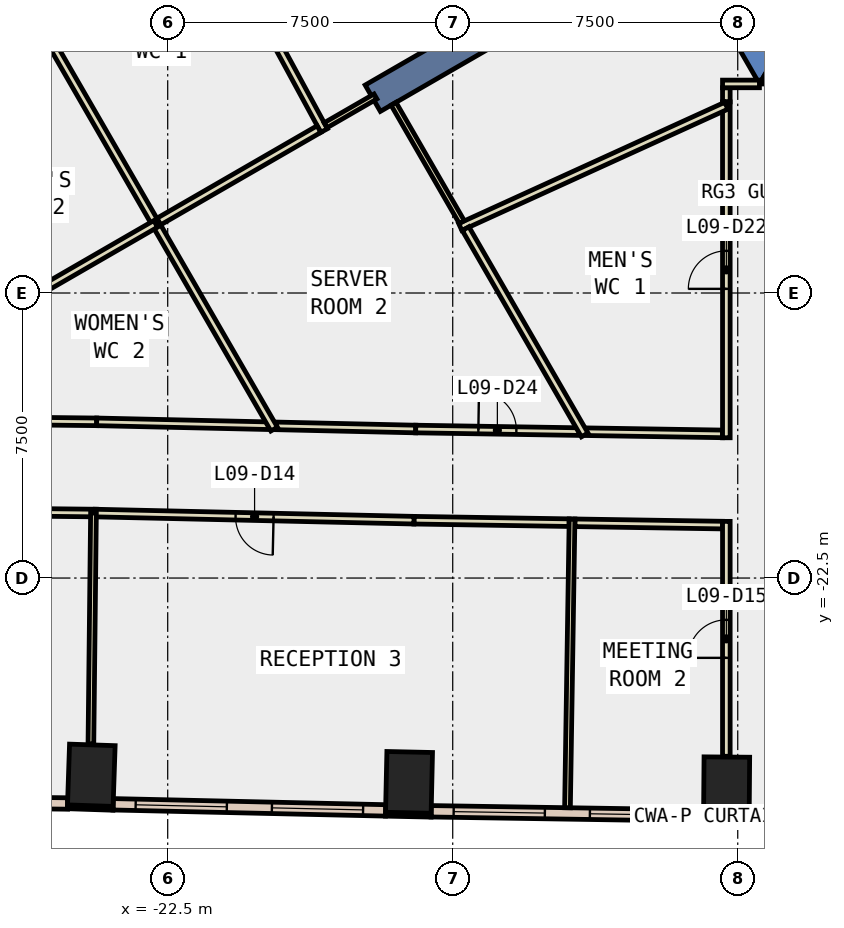
"""IFC4 building model, lengths in metres.
Left out: names, types, materials, properties, quantities, classifications, styles, units other than length and angle.
Written with IfcOpenShell. Run it as: python <this file> out.ifc"""

import sys

from ifc_helpers import new_model, si_unit, direction, frame, frame_2d, origin, origin_2d, place, context, subcontext, project, spatial, polyline, rectangle, outline, extrude, element, fill, save


model = new_model("IFC4")
c1 = context("Model", 3, precision=1e-05, world=origin(), true_north=direction((0.0, 1.0)))
c2 = subcontext(c1, "Body", "Model", "MODEL_VIEW")
j1 = project(units=[si_unit("LENGTHUNIT", "METRE"), si_unit("PLANEANGLEUNIT", "RADIAN")], contexts=[c1])
p1 = place(None, origin())
s1 = spatial("IfcSite", under=j1, at=p1, CompositionType="ELEMENT")
p2 = place(p1, origin())
s2 = spatial("IfcBuilding", under=s1, at=p2, CompositionType="ELEMENT")
p3 = place(p2, frame((0.0, 0.0, 47.6)))
s3 = spatial("IfcBuildingStorey", under=s2, at=p3, CompositionType="ELEMENT", Elevation=47.6)
for number, where, z_axis, x_axis in (
    (1, (-24.51, -27.69, -0.4), (0.0, 0.0, 1.0), (-0.999, 0.034, 0.0)),
    (2, (-16.15, -27.877, -0.4), (0.0, 0.0, 1.0), (-1.0, 0.022, 0.0)),
    (3, (-7.793, -28.01, -0.4), (0.0, 0.0, 1.0), (-1.0, 0.008, 0.0)),
):
    element("IfcColumn", number, at=place(p3, frame(where, z_axis=z_axis, x_axis=x_axis)), inside=s3, PredefinedType="COLUMN", context=c2, shape_type="SweptSolid", body=[
        extrude(rectangle(XDim=1.2, YDim=1.6, at=origin_2d()), origin(), (0.0, 0.0, 1.0), 4.2),
    ])
p4 = place(p3, frame((0.0, 0.0, -0.4)))
e4 = element("IfcWall", 4, at=p4, inside=s3, PredefinedType="SHEAR", context=c2, shape_type="SweptSolid", body=[
    extrude(outline(polyline([(-13.856, 2.5), (-6.928, -9.5), (-6.351, -8.5), (-12.702, 2.5), (-13.856, 2.5)])), origin(), (0.0, 0.0, 1.0), 4.2),
])
p5 = place(p3, frame((0.0, 0.0, -0.4)))
e5 = element("IfcWall", 5, at=p5, inside=s3, PredefinedType="SHEAR", context=c2, shape_type="SweptSolid", body=[
    extrude(outline(polyline([(3.75, -9.5), (3.75, -8.5), (-6.351, -8.5), (-6.928, -9.5), (3.75, -9.5)])), origin(), (0.0, 0.0, 1.0), 4.2),
])
p6 = place(p3, frame((-9.31, -5.375, -0.4), z_axis=(0.0, 0.0, 1.0), x_axis=(-0.866017533419, -0.500013631625, 0.0)))
e6 = element("IfcWall", 6, at=p6, inside=s3, PredefinedType="SHEAR", context=c2, shape_type="SweptSolid", body=[
    extrude(rectangle(XDim=9.0, YDim=0.8, at=frame_2d((4.5, 0.0))), origin(), (0.0, 0.0, 1.0), 4.2),
])
p7 = place(p3, frame((-25.138, -28.519, 0.0), z_axis=(0.0, 0.0, 1.0), x_axis=(0.999442872267, -0.03337581573, 0.0)))
e7 = element("IfcWall", 7, at=p7, inside=s3, PredefinedType="STANDARD", context=c2, shape_type="SweptSolid", body=[
    extrude(rectangle(XDim=1.2, YDim=0.1, at=frame_2d((0.6, 0.0))), origin(), (0.0, 0.0, 1.0), 3.8),
])
p8 = place(p3, frame((-16.769, -28.714, 0.0), z_axis=(0.0, 0.0, 1.0), x_axis=(0.99976752127, -0.021561618973, 0.0)))
e8 = element("IfcWall", 8, at=p8, inside=s3, PredefinedType="STANDARD", context=c2, shape_type="SweptSolid", body=[
    extrude(rectangle(XDim=1.2, YDim=0.1, at=frame_2d((0.6, 0.0))), origin(), (0.0, 0.0, 1.0), 3.8),
])
p9 = place(p3, frame((-8.4, -28.855, 0.0), z_axis=(0.0, 0.0, 1.0), x_axis=(0.999965208912, -0.008341520563, 0.0)))
e9 = element("IfcWall", 9, at=p9, inside=s3, PredefinedType="STANDARD", context=c2, shape_type="SweptSolid", body=[
    extrude(rectangle(XDim=1.2, YDim=0.1, at=frame_2d((0.6, 0.0))), origin(), (0.0, 0.0, 1.0), 3.8),
])
p10 = place(p3, frame((-32.279, -28.353, 0.0), z_axis=(0.0, 0.0, 1.0), x_axis=(0.999939101213, -0.011036025753, 0.0)))
e10 = element("IfcWall", 10, at=p10, inside=s3, PredefinedType="STANDARD", context=c2, shape_type="SweptSolid", body=[
    extrude(rectangle(XDim=7.146, YDim=0.3, at=frame_2d((3.573, 0.0))), origin(), (0.0, 0.0, 1.0), 3.8),
])
p11 = place(p10, frame((0.586, 0.0, 0.9)))
e11 = element("IfcOpeningElement", 11, at=p11, cuts=e10, PredefinedType="OPENING", context=c2, shape_type="SweptSolid", body=[
    extrude(rectangle(XDim=2.4, YDim=2.6, at=frame_2d((1.2, 1.3))), frame((0.0, 0.16, 0.0), z_axis=(0.0, -1.0, 0.0), x_axis=(1.0, 0.0, 0.0)), (0.0, 0.0, 1.0), 0.32),
])
p12 = place(p10, frame((4.159, 0.0, 0.9)))
e12 = element("IfcOpeningElement", 12, at=p12, cuts=e10, PredefinedType="OPENING", context=c2, shape_type="SweptSolid", body=[
    extrude(rectangle(XDim=2.4, YDim=2.6, at=frame_2d((1.2, 1.3))), frame((0.0, 0.16, 0.0), z_axis=(0.0, -1.0, 0.0), x_axis=(1.0, 0.0, 0.0)), (0.0, 0.0, 1.0), 0.32),
])
p13 = place(p3, frame((-23.936, -28.453, 0.0), z_axis=(0.0, 0.0, 1.0), x_axis=(0.999747567852, -0.022467767461, 0.0)))
e13 = element("IfcWall", 13, at=p13, inside=s3, PredefinedType="STANDARD", context=c2, shape_type="SweptSolid", body=[
    extrude(rectangle(XDim=7.172, YDim=0.3, at=frame_2d((3.586, 0.0))), origin(), (0.0, 0.0, 1.0), 3.8),
])
p14 = place(p13, frame((0.593, 0.0, 0.9)))
e14 = element("IfcOpeningElement", 14, at=p14, cuts=e13, PredefinedType="OPENING", context=c2, shape_type="SweptSolid", body=[
    extrude(rectangle(XDim=2.4, YDim=2.6, at=frame_2d((1.2, 1.3))), frame((0.0, 0.16, 0.0), z_axis=(0.0, -1.0, 0.0), x_axis=(1.0, 0.0, 0.0)), (0.0, 0.0, 1.0), 0.32),
])
p15 = place(p13, frame((4.179, 0.0, 0.9)))
e15 = element("IfcOpeningElement", 15, at=p15, cuts=e13, PredefinedType="OPENING", context=c2, shape_type="SweptSolid", body=[
    extrude(rectangle(XDim=2.4, YDim=2.6, at=frame_2d((1.2, 1.3))), frame((0.0, 0.16, 0.0), z_axis=(0.0, -1.0, 0.0), x_axis=(1.0, 0.0, 0.0)), (0.0, 0.0, 1.0), 0.32),
])
p16 = place(p3, frame((-15.568, -28.637, 0.0), z_axis=(0.0, 0.0, 1.0), x_axis=(0.999875756772, -0.015762963512, 0.0)))
e16 = element("IfcWall", 16, at=p16, inside=s3, PredefinedType="STANDARD", context=c2, shape_type="SweptSolid", body=[
    extrude(rectangle(XDim=7.171, YDim=0.3, at=frame_2d((3.585, 0.0))), origin(), (0.0, 0.0, 1.0), 3.8),
])
p17 = place(p16, frame((0.593, 0.0, 0.9)))
e17 = element("IfcOpeningElement", 17, at=p17, cuts=e16, PredefinedType="OPENING", context=c2, shape_type="SweptSolid", body=[
    extrude(rectangle(XDim=2.4, YDim=2.6, at=frame_2d((1.2, 1.3))), frame((0.0, 0.16, 0.0), z_axis=(0.0, -1.0, 0.0), x_axis=(1.0, 0.0, 0.0)), (0.0, 0.0, 1.0), 0.32),
])
p18 = place(p16, frame((4.178, 0.0, 0.9)))
e18 = element("IfcOpeningElement", 18, at=p18, cuts=e16, PredefinedType="OPENING", context=c2, shape_type="SweptSolid", body=[
    extrude(rectangle(XDim=2.4, YDim=2.6, at=frame_2d((1.2, 1.3))), frame((0.0, 0.16, 0.0), z_axis=(0.0, -1.0, 0.0), x_axis=(1.0, 0.0, 0.0)), (0.0, 0.0, 1.0), 0.32),
])
p19 = place(p3, frame((-11.477, -18.65, 0.0), z_axis=(0.0, 0.0, 1.0), x_axis=(0.9998724957, -0.015968479661, 0.0)))
e19 = element("IfcWall", 19, at=p19, inside=s3, PredefinedType="PARTITIONING", context=c2, shape_type="SweptSolid", body=[
    extrude(rectangle(XDim=3.578, YDim=0.2, at=frame_2d((1.789, 0.0))), origin(), (0.0, 0.0, 1.0), 3.8),
])
p20 = place(p3, frame((-19.649, -18.496, 0.0), z_axis=(0.0, 0.0, 1.0), x_axis=(0.999744980574, -0.02258259988, 0.0)))
e20 = element("IfcWall", 20, at=p20, inside=s3, PredefinedType="PARTITIONING", context=c2, shape_type="SweptSolid", body=[
    extrude(rectangle(XDim=3.676, YDim=0.2, at=frame_2d((1.838, 0.0))), origin(), (0.0, 0.0, 1.0), 3.8),
])
p21 = place(p3, frame((-15.974, -18.579, 0.0), z_axis=(0.0, 0.0, 1.0), x_axis=(0.999875289316, -0.015792587377, 0.0)))
e21 = element("IfcWall", 21, at=p21, inside=s3, PredefinedType="PARTITIONING", context=c2, shape_type="SweptSolid", body=[
    extrude(rectangle(XDim=4.298, YDim=0.2, at=frame_2d((2.149, 0.0))), origin(), (0.0, 0.0, 1.0), 3.8),
])
p22 = place(p21, frame((1.649, 0.0, 0.0)))
e22 = element("IfcOpeningElement", 22, at=p22, cuts=e21, PredefinedType="OPENING", context=c2, shape_type="SweptSolid", body=[
    extrude(rectangle(XDim=1.0, YDim=2.1, at=frame_2d((0.5, 1.05))), frame((0.0, 0.11, 0.0), z_axis=(0.0, -1.0, 0.0), x_axis=(1.0, 0.0, 0.0)), (0.0, 0.0, 1.0), 0.22),
])
p23 = place(p3, frame((-31.431, -18.312, 0.0), z_axis=(0.0, 0.0, 1.0), x_axis=(0.999939195602, -0.011027470214, 0.0)))
e23 = element("IfcWall", 23, at=p23, inside=s3, PredefinedType="PARTITIONING", context=c2, shape_type="SweptSolid", body=[
    extrude(rectangle(XDim=7.062, YDim=0.2, at=frame_2d((3.531, 0.0))), origin(), (0.0, 0.0, 1.0), 3.8),
])
p24 = place(p23, frame((3.031, 0.0, 0.0)))
e24 = element("IfcOpeningElement", 24, at=p24, cuts=e23, PredefinedType="OPENING", context=c2, shape_type="SweptSolid", body=[
    extrude(rectangle(XDim=1.0, YDim=2.1, at=frame_2d((0.5, 1.05))), frame((0.0, 0.11, 0.0), z_axis=(0.0, -1.0, 0.0), x_axis=(1.0, 0.0, 0.0)), (0.0, 0.0, 1.0), 0.22),
])
p25 = place(p3, frame((-24.369, -18.39, 0.0), z_axis=(0.0, 0.0, 1.0), x_axis=(0.99974519793, -0.022572975354, 0.0)))
e25 = element("IfcWall", 25, at=p25, inside=s3, PredefinedType="PARTITIONING", context=c2, shape_type="SweptSolid", body=[
    extrude(rectangle(XDim=4.521, YDim=0.2, at=frame_2d((2.26, 0.0))), origin(), (0.0, 0.0, 1.0), 3.8),
])
p26 = place(p3, frame((-24.378, -20.79, 0.0), z_axis=(0.0, 0.0, 1.0), x_axis=(-0.99993897746, 0.011047232974, 0.0)))
e26 = element("IfcWall", 26, at=p26, inside=s3, PredefinedType="PARTITIONING", context=c2, shape_type="SweptSolid", body=[
    extrude(rectangle(XDim=7.426, YDim=0.2, at=frame_2d((3.713, 0.0))), origin(), (0.0, 0.0, 1.0), 3.8),
])
p27 = place(p3, frame((-11.936, -21.043, 0.0), z_axis=(0.0, 0.0, 1.0), x_axis=(-0.999873595398, 0.015899472524, 0.0)))
e27 = element("IfcWall", 27, at=p27, inside=s3, PredefinedType="PARTITIONING", context=c2, shape_type="SweptSolid", body=[
    extrude(rectangle(XDim=4.084, YDim=0.2, at=frame_2d((2.042, 0.0))), origin(), (0.0, 0.0, 1.0), 3.8),
])
p28 = place(p3, frame((-16.02, -20.978, 0.0), z_axis=(0.0, 0.0, 1.0), x_axis=(-0.999749010047, 0.02240350216, 0.0)))
e28 = element("IfcWall", 28, at=p28, inside=s3, PredefinedType="PARTITIONING", context=c2, shape_type="SweptSolid", body=[
    extrude(rectangle(XDim=8.391, YDim=0.2, at=frame_2d((4.196, 0.0))), origin(), (0.0, 0.0, 1.0), 3.8),
])
p29 = place(p28, frame((3.695, 0.0, 0.0)))
e29 = element("IfcOpeningElement", 29, at=p29, cuts=e28, PredefinedType="OPENING", context=c2, shape_type="SweptSolid", body=[
    extrude(rectangle(XDim=1.0, YDim=2.1, at=frame_2d((0.5, 1.05))), frame((0.0, 0.11, 0.0), z_axis=(0.0, -1.0, 0.0), x_axis=(1.0, 0.0, 0.0)), (0.0, 0.0, 1.0), 0.22),
])
p30 = place(p3, frame((-7.9, -21.107, 0.0), z_axis=(0.0, 0.0, 1.0), x_axis=(-0.999876676102, 0.015704540367, 0.0)))
e30 = element("IfcWall", 30, at=p30, inside=s3, PredefinedType="PARTITIONING", context=c2, shape_type="SweptSolid", body=[
    extrude(rectangle(XDim=3.886, YDim=0.2, at=frame_2d((1.943, 0.0))), origin(), (0.0, 0.0, 1.0), 3.8),
])
p31 = place(p3, frame((-7.8, -9.972, 0.0), z_axis=(0.0, 0.0, 1.0), x_axis=(0.0, 1.0, 0.0)))
e31 = element("IfcWall", 31, at=p31, inside=s3, PredefinedType="PARTITIONING", context=c2, shape_type="SweptSolid", body=[
    extrude(rectangle(XDim=0.373, YDim=0.2, at=frame_2d((0.187, 0.0))), origin(), (0.0, 0.0, 1.0), 3.8),
])
p32 = place(p3, frame((-7.9, -9.499, 0.0), z_axis=(0.0, 0.0, 1.0), x_axis=(1.0, 0.0, 0.0)))
e32 = element("IfcWall", 32, at=p32, inside=s3, PredefinedType="PARTITIONING", context=c2, shape_type="SweptSolid", body=[
    extrude(rectangle(XDim=0.971, YDim=0.2, at=frame_2d((0.485, 0.0))), origin(), (0.0, 0.0, 1.0), 3.8),
])
p33 = place(p3, frame((-7.8, -18.809, 0.0), z_axis=(0.0, 0.0, 1.0), x_axis=(0.0, 1.0, 0.0)))
e33 = element("IfcWall", 33, at=p33, inside=s3, PredefinedType="PARTITIONING", context=c2, shape_type="SweptSolid", body=[
    extrude(rectangle(XDim=8.837, YDim=0.2, at=frame_2d((4.418, 0.0))), origin(), (0.0, 0.0, 1.0), 3.8),
])
p34 = place(p33, frame((3.918, 0.0, 0.0)))
e34 = element("IfcOpeningElement", 34, at=p34, cuts=e33, PredefinedType="OPENING", context=c2, shape_type="SweptSolid", body=[
    extrude(rectangle(XDim=1.0, YDim=2.1, at=frame_2d((0.5, 1.05))), frame((0.0, 0.11, 0.0), z_axis=(0.0, -1.0, 0.0), x_axis=(1.0, 0.0, 0.0)), (0.0, 0.0, 1.0), 0.22),
])
p35 = place(p3, frame((-7.8, -27.19, 0.0), z_axis=(0.0, 0.0, 1.0), x_axis=(0.0, 1.0, 0.0)))
e35 = element("IfcWall", 35, at=p35, inside=s3, PredefinedType="PARTITIONING", context=c2, shape_type="SweptSolid", body=[
    extrude(rectangle(XDim=6.181, YDim=0.2, at=frame_2d((3.09, 0.0))), origin(), (0.0, 0.0, 1.0), 3.8),
])
p36 = place(p35, frame((2.59, 0.0, 0.0)))
e36 = element("IfcOpeningElement", 36, at=p36, cuts=e35, PredefinedType="OPENING", context=c2, shape_type="SweptSolid", body=[
    extrude(rectangle(XDim=1.0, YDim=2.1, at=frame_2d((0.5, 1.05))), frame((0.0, 0.11, 0.0), z_axis=(0.0, -1.0, 0.0), x_axis=(1.0, 0.0, 0.0)), (0.0, 0.0, 1.0), 0.22),
])
p37 = place(p3, frame((-7.8, -10.072, 0.0), z_axis=(0.0, 0.0, 1.0), x_axis=(-0.910011899741, -0.414582129777, 0.0)))
e37 = element("IfcWall", 37, at=p37, inside=s3, PredefinedType="PARTITIONING", context=c2, shape_type="SweptSolid", body=[
    extrude(rectangle(XDim=7.694, YDim=0.2, at=frame_2d((3.847, 0.0))), origin(), (0.0, 0.0, 1.0), 3.8),
])
p38 = place(p3, frame((-18.384, -10.725, 0.0), z_axis=(0.0, 0.0, 1.0), x_axis=(-0.477137547132, 0.878828630119, 0.0)))
e38 = element("IfcWall", 38, at=p38, inside=s3, PredefinedType="PARTITIONING", context=c2, shape_type="SweptSolid", body=[
    extrude(rectangle(XDim=9.552, YDim=0.2, at=frame_2d((4.776, 0.0))), origin(), (0.0, 0.0, 1.0), 3.8),
])
p39 = place(p3, frame((-14.761, -13.134, 0.0), z_axis=(0.0, 0.0, 1.0), x_axis=(-0.499704810774, 0.866195764299, 0.0)))
e39 = element("IfcWall", 39, at=p39, inside=s3, PredefinedType="PARTITIONING", context=c2, shape_type="SweptSolid", body=[
    extrude(rectangle(XDim=3.594, YDim=0.15, at=frame_2d((1.797, 0.0))), origin(), (0.0, 0.0, 1.0), 3.8),
])
p40 = place(p3, frame((-17.033, -9.829, 0.0), z_axis=(0.0, 0.0, 1.0), x_axis=(-0.866094414679, -0.49988045057, 0.0)))
e40 = element("IfcWall", 40, at=p40, inside=s3, PredefinedType="PARTITIONING", context=c2, shape_type="SweptSolid", body=[
    extrude(rectangle(XDim=1.516, YDim=0.15, at=frame_2d((0.758, 0.0))), origin(), (0.0, 0.0, 1.0), 3.8),
])
p41 = place(p3, frame((-11.527, -18.735, 0.0), z_axis=(0.0, 0.0, 1.0), x_axis=(-0.499976457224, 0.866038995786, 0.0)))
e41 = element("IfcWall", 41, at=p41, inside=s3, PredefinedType="PARTITIONING", context=c2, shape_type="SweptSolid", body=[
    extrude(rectangle(XDim=6.268, YDim=0.2, at=frame_2d((3.134, 0.0))), origin(), (0.0, 0.0, 1.0), 3.8),
])
p42 = place(p3, frame((-18.519, -10.687, 0.0), z_axis=(0.0, 0.0, 1.0), x_axis=(-0.866063668779, -0.499933717229, 0.0)))
e42 = element("IfcWall", 42, at=p42, inside=s3, PredefinedType="PARTITIONING", context=c2, shape_type="SweptSolid", body=[
    extrude(rectangle(XDim=4.969, YDim=0.2, at=frame_2d((2.484, 0.0))), origin(), (0.0, 0.0, 1.0), 3.8),
])
p43 = place(p3, frame((-22.822, -13.171, 0.0), z_axis=(0.0, 0.0, 1.0), x_axis=(-0.499974913987, 0.866039886717, 0.0)))
e43 = element("IfcWall", 43, at=p43, inside=s3, PredefinedType="PARTITIONING", context=c2, shape_type="SweptSolid", body=[
    extrude(rectangle(XDim=6.222, YDim=0.2, at=frame_2d((3.111, 0.0))), origin(), (0.0, 0.0, 1.0), 3.8),
])
p44 = place(p3, frame((-19.699, -18.581, 0.0), z_axis=(0.0, 0.0, 1.0), x_axis=(-0.499899838407, 0.866083224385, 0.0)))
e44 = element("IfcWall", 44, at=p44, inside=s3, PredefinedType="PARTITIONING", context=c2, shape_type="SweptSolid", body=[
    extrude(rectangle(XDim=6.235, YDim=0.2, at=frame_2d((3.118, 0.0))), origin(), (0.0, 0.0, 1.0), 3.8),
])
p45 = place(p3, frame((-22.816, -13.181, 0.0), z_axis=(0.0, 0.0, 1.0), x_axis=(-0.86601529143, -0.500017514703, 0.0)))
e45 = element("IfcWall", 45, at=p45, inside=s3, PredefinedType="PARTITIONING", context=c2, shape_type="SweptSolid", body=[
    extrude(rectangle(XDim=9.932, YDim=0.2, at=frame_2d((4.966, 0.0))), origin(), (0.0, 0.0, 1.0), 3.8),
])
p46 = place(p3, frame((-24.453, -20.79, 0.0), z_axis=(0.0, 0.0, 1.0), x_axis=(-0.011204565898, -0.999937226881, 0.0)))
e46 = element("IfcWall", 46, at=p46, inside=s3, PredefinedType="PARTITIONING", context=c2, shape_type="SweptSolid", body=[
    extrude(rectangle(XDim=6.079, YDim=0.15, at=frame_2d((3.04, 0.0))), origin(), (0.0, 0.0, 1.0), 3.8),
])
p47 = place(p3, frame((-11.86, -20.945, 0.0), z_axis=(0.0, 0.0, 1.0), x_axis=(-0.015773137921, -0.999875596322, 0.0)))
e47 = element("IfcWall", 47, at=p47, inside=s3, PredefinedType="PARTITIONING", context=c2, shape_type="SweptSolid", body=[
    extrude(rectangle(XDim=7.6, YDim=0.15, at=frame_2d((3.8, 0.0))), origin(), (0.0, 0.0, 1.0), 3.8),
])
p48 = place(p14, origin())
e48 = element("IfcWindow", 48, at=p48, inside=s3, PartitioningType="SINGLE_PANEL", PredefinedType="WINDOW", context=c2, shape_type="SweptSolid", body=[
    extrude(rectangle(XDim=2.4, YDim=2.6, at=frame_2d((1.2, 1.3))), frame((0.0, 0.03, 0.0), z_axis=(0.0, -1.0, 0.0), x_axis=(1.0, 0.0, 0.0)), (0.0, 0.0, 1.0), 0.06),
])
fill(e14, e48)
p49 = place(p15, origin())
e49 = element("IfcWindow", 49, at=p49, inside=s3, PartitioningType="SINGLE_PANEL", PredefinedType="WINDOW", context=c2, shape_type="SweptSolid", body=[
    extrude(rectangle(XDim=2.4, YDim=2.6, at=frame_2d((1.2, 1.3))), frame((0.0, 0.03, 0.0), z_axis=(0.0, -1.0, 0.0), x_axis=(1.0, 0.0, 0.0)), (0.0, 0.0, 1.0), 0.06),
])
fill(e15, e49)
p50 = place(p17, origin())
e50 = element("IfcWindow", 50, at=p50, inside=s3, PartitioningType="SINGLE_PANEL", PredefinedType="WINDOW", context=c2, shape_type="SweptSolid", body=[
    extrude(rectangle(XDim=2.4, YDim=2.6, at=frame_2d((1.2, 1.3))), frame((0.0, 0.03, 0.0), z_axis=(0.0, -1.0, 0.0), x_axis=(1.0, 0.0, 0.0)), (0.0, 0.0, 1.0), 0.06),
])
fill(e17, e50)
p51 = place(p18, origin())
e51 = element("IfcWindow", 51, at=p51, inside=s3, PartitioningType="SINGLE_PANEL", PredefinedType="WINDOW", context=c2, shape_type="SweptSolid", body=[
    extrude(rectangle(XDim=2.4, YDim=2.6, at=frame_2d((1.2, 1.3))), frame((0.0, 0.03, 0.0), z_axis=(0.0, -1.0, 0.0), x_axis=(1.0, 0.0, 0.0)), (0.0, 0.0, 1.0), 0.06),
])
fill(e18, e51)
p52 = place(p29, origin())
e52 = element("IfcDoor", 52, at=p52, inside=s3, OperationType="SINGLE_SWING_RIGHT", PredefinedType="DOOR", context=c2, shape_type="SweptSolid", body=[
    extrude(rectangle(XDim=1.0, YDim=2.1, at=frame_2d((0.5, 1.05))), frame((0.0, 0.025, 0.0), z_axis=(0.0, -1.0, 0.0), x_axis=(1.0, 0.0, 0.0)), (0.0, 0.0, 1.0), 0.05),
])
fill(e29, e52)
p53 = place(p36, origin())
e53 = element("IfcDoor", 53, at=p53, inside=s3, OperationType="SINGLE_SWING_LEFT", PredefinedType="DOOR", context=c2, shape_type="SweptSolid", body=[
    extrude(rectangle(XDim=1.0, YDim=2.1, at=frame_2d((0.5, 1.05))), frame((0.0, 0.025, 0.0), z_axis=(0.0, -1.0, 0.0), x_axis=(1.0, 0.0, 0.0)), (0.0, 0.0, 1.0), 0.05),
])
fill(e36, e53)
p54 = place(p34, origin())
e54 = element("IfcDoor", 54, at=p54, inside=s3, OperationType="SINGLE_SWING_RIGHT", PredefinedType="DOOR", context=c2, shape_type="SweptSolid", body=[
    extrude(rectangle(XDim=1.0, YDim=2.1, at=frame_2d((0.5, 1.05))), frame((0.0, 0.025, 0.0), z_axis=(0.0, -1.0, 0.0), x_axis=(1.0, 0.0, 0.0)), (0.0, 0.0, 1.0), 0.05),
])
fill(e34, e54)
p55 = place(p22, origin())
e55 = element("IfcDoor", 55, at=p55, inside=s3, OperationType="SINGLE_SWING_LEFT", PredefinedType="DOOR", context=c2, shape_type="SweptSolid", body=[
    extrude(rectangle(XDim=1.0, YDim=2.1, at=frame_2d((0.5, 1.05))), frame((0.0, 0.025, 0.0), z_axis=(0.0, -1.0, 0.0), x_axis=(1.0, 0.0, 0.0)), (0.0, 0.0, 1.0), 0.05),
])
fill(e22, e55)
save(model, sys.argv[1])
